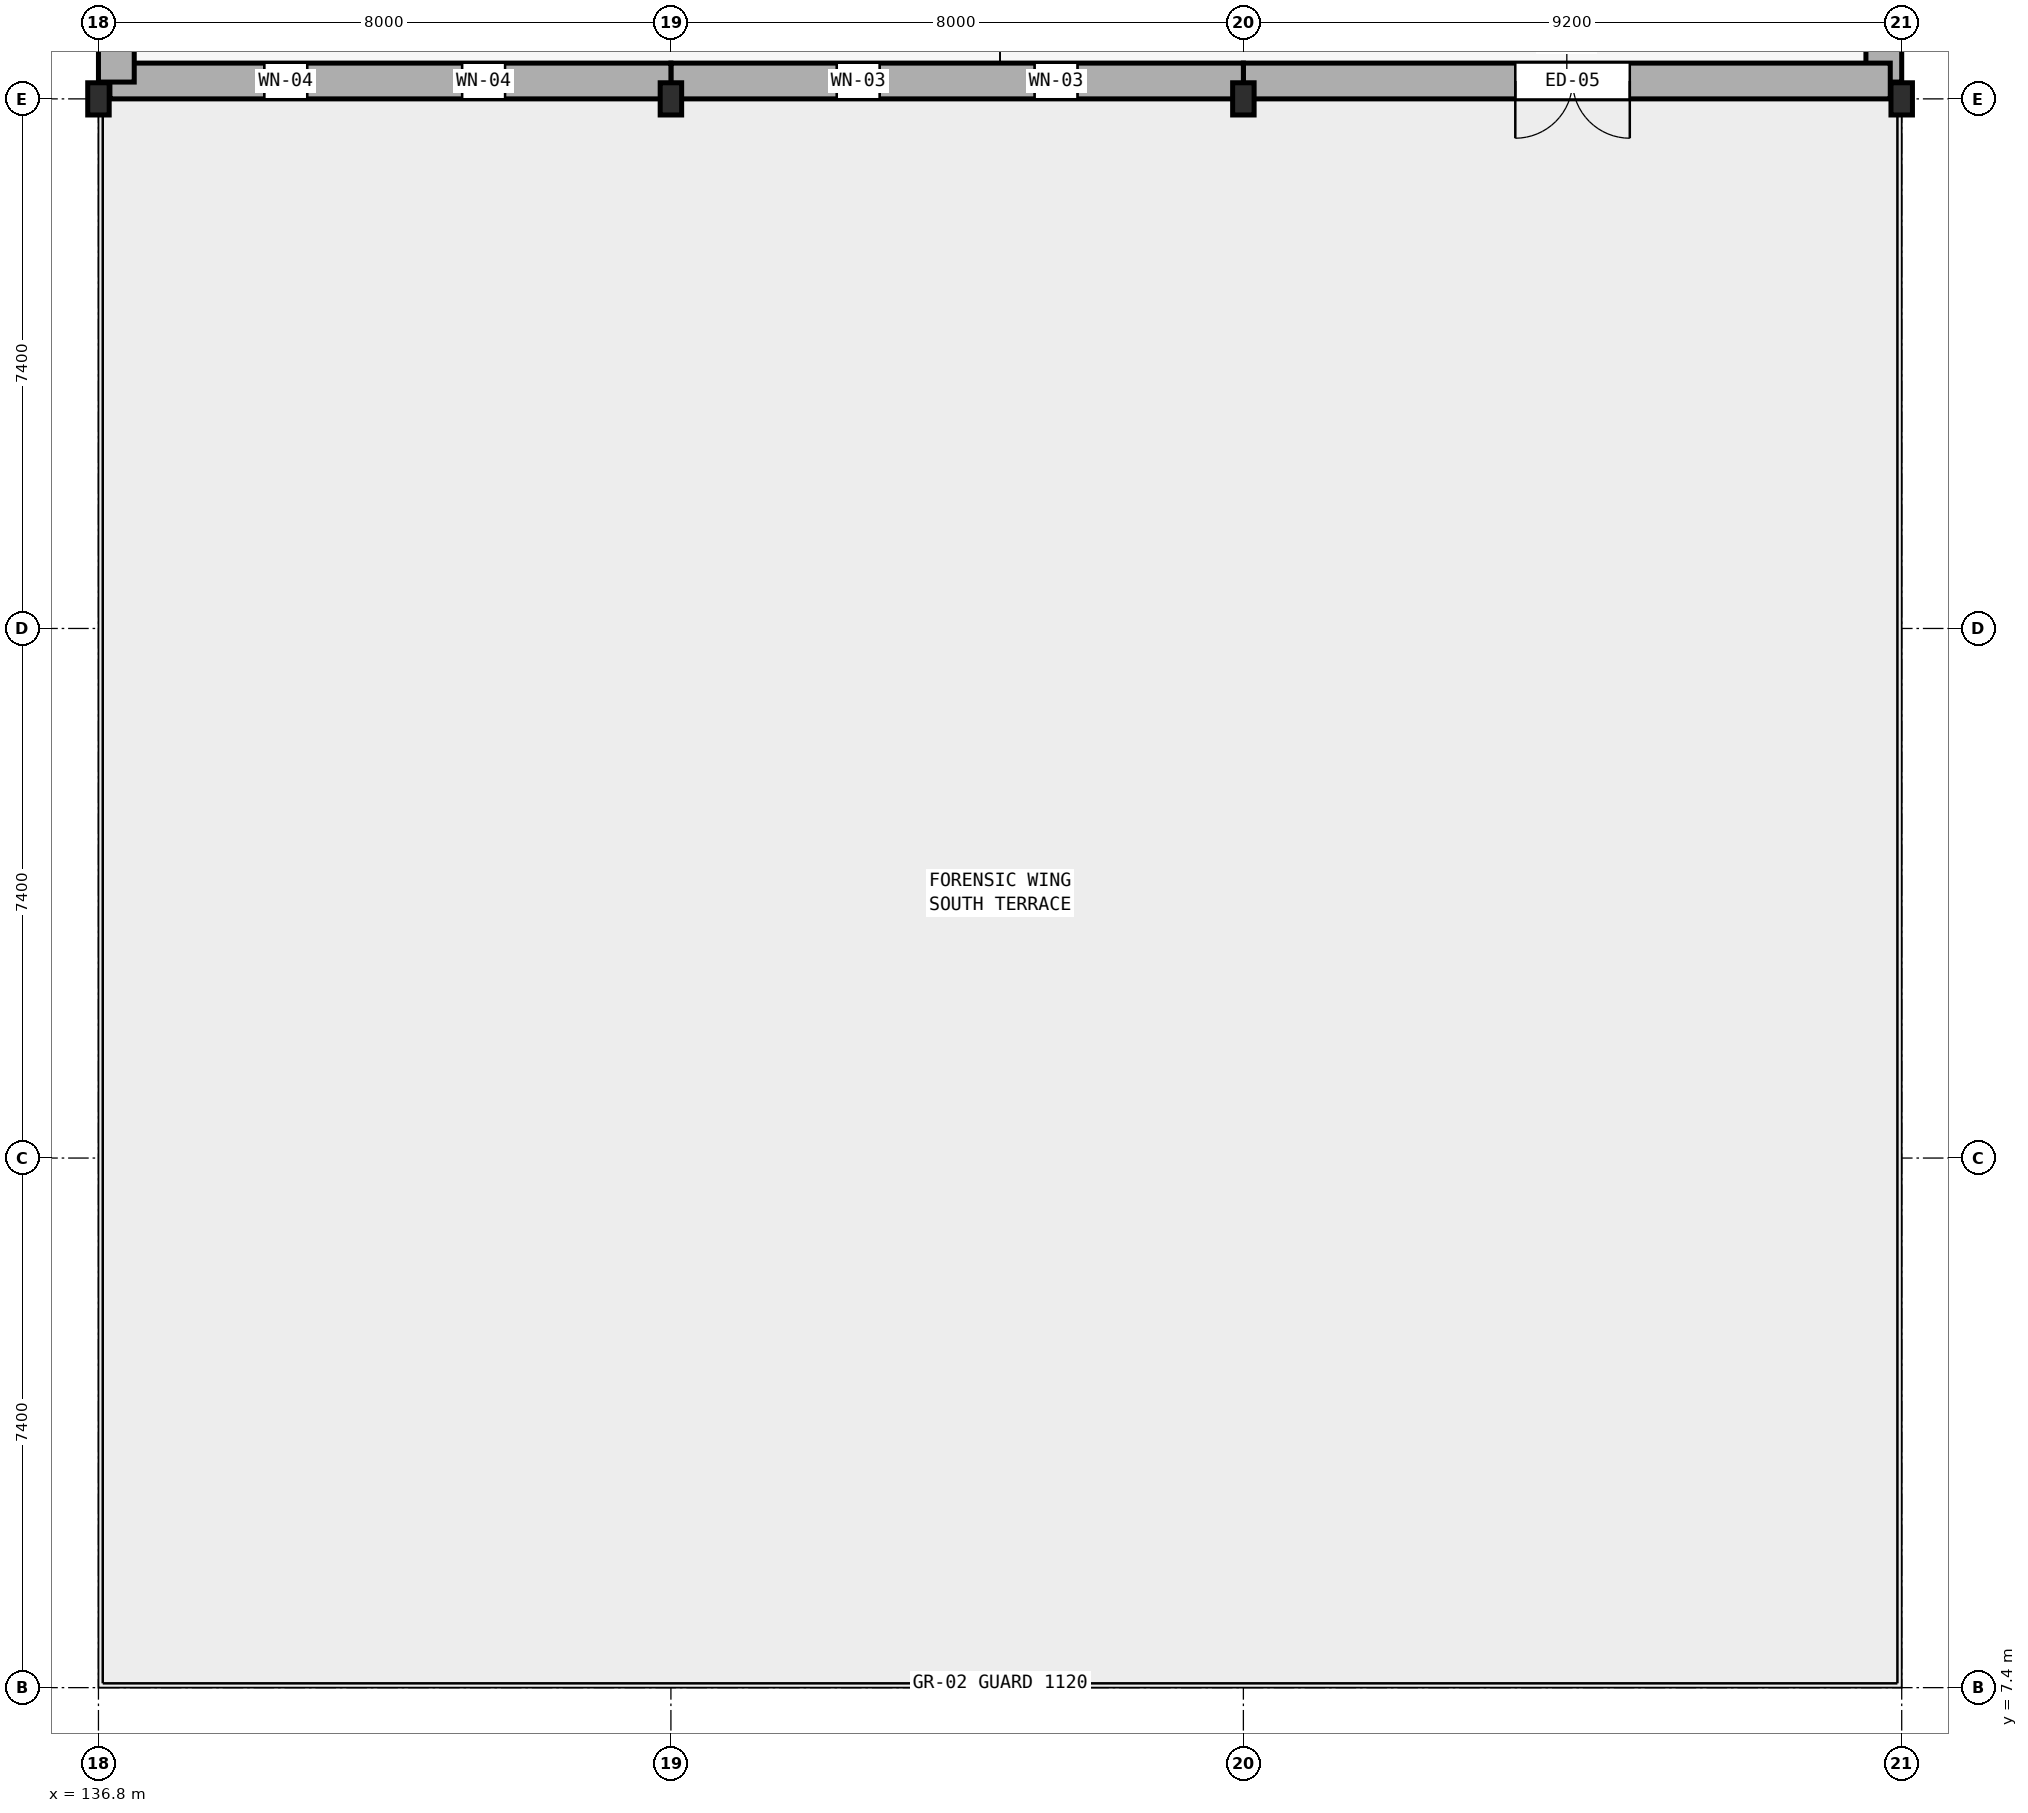
"""IFC4 building model, lengths in metres.
Left out: names, types, materials, properties, quantities, classifications, styles, units other than length and angle.
Written with IfcOpenShell. Run it as: python <this file> out.ifc"""

import sys

from ifc_helpers import new_model, si_unit, direction, frame, frame_2d, origin, origin_2d, place, context, subcontext, project, spatial, rectangle, i_section, extrude, element, fill, save


model = new_model("IFC4")
c1 = context("Model", 3, precision=1e-05, world=origin(), true_north=direction((0.0, 1.0)))
c2 = subcontext(c1, "Body", "Model", "MODEL_VIEW")
j1 = project(units=[si_unit("LENGTHUNIT", "METRE"), si_unit("PLANEANGLEUNIT", "RADIAN")], contexts=[c1])
p1 = place(None, origin())
s1 = spatial("IfcSite", under=j1, at=p1, CompositionType="ELEMENT")
p2 = place(p1, origin())
s2 = spatial("IfcBuilding", under=s1, at=p2, CompositionType="ELEMENT")
p3 = place(p2, frame((0.0, 0.0, 9.9)))
s3 = spatial("IfcBuildingStorey", under=s2, at=p3, CompositionType="ELEMENT", Elevation=9.9)
for number, where, z_axis, x_axis in (
    (1, (136.8, 29.6, 0.0), (0.0, 0.0, 1.0), (1.0, 0.0, 0.0)),
    (2, (144.8, 29.6, 0.0), (0.0, 0.0, 1.0), (1.0, 0.0, 0.0)),
    (3, (152.8, 29.6, 0.0), (0.0, 0.0, 1.0), (1.0, 0.0, 0.0)),
    (4, (162.0, 29.6, 0.0), (0.0, 0.0, 1.0), (1.0, 0.0, 0.0)),
):
    element("IfcColumn", number, at=place(p3, frame(where, z_axis=z_axis, x_axis=x_axis)), inside=s3, PredefinedType="COLUMN", context=c2, shape_type="SweptSolid", body=[
        extrude(i_section(OverallWidth=0.3, OverallDepth=0.45, WebThickness=0.014, FlangeThickness=0.026, FilletRadius=0.027, at=origin_2d()), origin(), (0.0, 0.0, 1.0), 4.2),
    ])
p4 = place(p3, frame((161.75, 37.0, 0.0), z_axis=(0.0, 0.0, 1.0), x_axis=(0.0, -1.0, 0.0)))
e5 = element("IfcWall", 5, at=p4, inside=s3, PredefinedType="STANDARD", context=c2, shape_type="SweptSolid", body=[
    extrude(rectangle(XDim=7.165, YDim=0.5, at=frame_2d((3.583, 0.0))), origin(), (0.0, 0.0, 1.0), 3.92),
])
p5 = place(p4, frame((2.103, 0.0, 0.9)))
e6 = element("IfcOpeningElement", 6, at=p5, cuts=e5, PredefinedType="OPENING", context=c2, shape_type="SweptSolid", body=[
    extrude(rectangle(XDim=0.7, YDim=2.4, at=frame_2d((0.35, 1.2))), frame((0.0, 0.26, 0.0), z_axis=(0.0, -1.0, 0.0), x_axis=(1.0, 0.0, 0.0)), (0.0, 0.0, 1.0), 0.52),
])
p6 = place(p4, frame((4.597, 0.0, 0.9)))
e7 = element("IfcOpeningElement", 7, at=p6, cuts=e5, PredefinedType="OPENING", context=c2, shape_type="SweptSolid", body=[
    extrude(rectangle(XDim=0.7, YDim=2.4, at=frame_2d((0.35, 1.2))), frame((0.0, 0.26, 0.0), z_axis=(0.0, -1.0, 0.0), x_axis=(1.0, 0.0, 0.0)), (0.0, 0.0, 1.0), 0.52),
])
p7 = place(p3, frame((161.84, 29.85, 0.0), z_axis=(0.0, 0.0, 1.0), x_axis=(-1.0, 0.0, 0.0)))
e8 = element("IfcWall", 8, at=p7, inside=s3, PredefinedType="STANDARD", context=c2, shape_type="SweptSolid", body=[
    extrude(rectangle(XDim=9.04, YDim=0.5, at=frame_2d((4.52, 0.0))), origin(), (0.0, 0.0, 1.0), 3.92),
])
p8 = place(p7, frame((3.64, 0.0, 0.0)))
e9 = element("IfcOpeningElement", 9, at=p8, cuts=e8, PredefinedType="OPENING", context=c2, shape_type="SweptSolid", body=[
    extrude(rectangle(XDim=1.6, YDim=2.3, at=frame_2d((0.8, 1.15))), frame((0.0, 0.26, 0.0), z_axis=(0.0, -1.0, 0.0), x_axis=(1.0, 0.0, 0.0)), (0.0, 0.0, 1.0), 0.52),
])
p9 = place(p3, frame((152.8, 29.85, 0.0), z_axis=(0.0, 0.0, 1.0), x_axis=(-1.0, 0.0, 0.0)))
e10 = element("IfcWall", 10, at=p9, inside=s3, PredefinedType="STANDARD", context=c2, shape_type="SweptSolid", body=[
    extrude(rectangle(XDim=8.0, YDim=0.5, at=frame_2d((4.0, 0.0))), origin(), (0.0, 0.0, 1.0), 3.92),
])
p10 = place(p9, frame((2.318, 0.0, 1.35)))
e11 = element("IfcOpeningElement", 11, at=p10, cuts=e10, PredefinedType="OPENING", context=c2, shape_type="SweptSolid", body=[
    extrude(rectangle(XDim=0.6, YDim=1.5, at=frame_2d((0.3, 0.75))), frame((0.0, 0.26, 0.0), z_axis=(0.0, -1.0, 0.0), x_axis=(1.0, 0.0, 0.0)), (0.0, 0.0, 1.0), 0.52),
])
p11 = place(p9, frame((5.083, 0.0, 1.35)))
e12 = element("IfcOpeningElement", 12, at=p11, cuts=e10, PredefinedType="OPENING", context=c2, shape_type="SweptSolid", body=[
    extrude(rectangle(XDim=0.6, YDim=1.5, at=frame_2d((0.3, 0.75))), frame((0.0, 0.26, 0.0), z_axis=(0.0, -1.0, 0.0), x_axis=(1.0, 0.0, 0.0)), (0.0, 0.0, 1.0), 0.52),
])
p12 = place(p3, frame((144.8, 29.85, 0.0), z_axis=(0.0, 0.0, 1.0), x_axis=(-1.0, 0.0, 0.0)))
e13 = element("IfcWall", 13, at=p12, inside=s3, PredefinedType="STANDARD", context=c2, shape_type="SweptSolid", body=[
    extrude(rectangle(XDim=7.84, YDim=0.5, at=frame_2d((3.92, 0.0))), origin(), (0.0, 0.0, 1.0), 3.92),
])
p13 = place(p12, frame((2.318, 0.0, 0.9)))
e14 = element("IfcOpeningElement", 14, at=p13, cuts=e13, PredefinedType="OPENING", context=c2, shape_type="SweptSolid", body=[
    extrude(rectangle(XDim=0.6, YDim=1.85, at=frame_2d((0.3, 0.925))), frame((0.0, 0.26, 0.0), z_axis=(0.0, -1.0, 0.0), x_axis=(1.0, 0.0, 0.0)), (0.0, 0.0, 1.0), 0.52),
])
p14 = place(p12, frame((5.083, 0.0, 0.9)))
e15 = element("IfcOpeningElement", 15, at=p14, cuts=e13, PredefinedType="OPENING", context=c2, shape_type="SweptSolid", body=[
    extrude(rectangle(XDim=0.6, YDim=1.85, at=frame_2d((0.3, 0.925))), frame((0.0, 0.26, 0.0), z_axis=(0.0, -1.0, 0.0), x_axis=(1.0, 0.0, 0.0)), (0.0, 0.0, 1.0), 0.52),
])
p15 = place(p3, frame((137.05, 29.835, 0.0), z_axis=(0.0, 0.0, 1.0), x_axis=(0.0, 1.0, 0.0)))
e16 = element("IfcWall", 16, at=p15, inside=s3, PredefinedType="STANDARD", context=c2, shape_type="SweptSolid", body=[
    extrude(rectangle(XDim=7.165, YDim=0.5, at=frame_2d((3.583, 0.0))), origin(), (0.0, 0.0, 1.0), 3.92),
])
p16 = place(p15, frame((1.743, 0.0, 0.9)))
e17 = element("IfcOpeningElement", 17, at=p16, cuts=e16, PredefinedType="OPENING", context=c2, shape_type="SweptSolid", body=[
    extrude(rectangle(XDim=0.95, YDim=1.8, at=frame_2d((0.475, 0.9))), frame((0.0, 0.26, 0.0), z_axis=(0.0, -1.0, 0.0), x_axis=(1.0, 0.0, 0.0)), (0.0, 0.0, 1.0), 0.52),
])
p17 = place(p15, frame((4.237, 0.0, 0.9)))
e18 = element("IfcOpeningElement", 18, at=p17, cuts=e16, PredefinedType="OPENING", context=c2, shape_type="SweptSolid", body=[
    extrude(rectangle(XDim=0.95, YDim=1.8, at=frame_2d((0.475, 0.9))), frame((0.0, 0.26, 0.0), z_axis=(0.0, -1.0, 0.0), x_axis=(1.0, 0.0, 0.0)), (0.0, 0.0, 1.0), 0.52),
])
p18 = place(p8, origin())
e19 = element("IfcDoor", 19, at=p18, inside=s3, OperationType="DOUBLE_DOOR_SINGLE_SWING", PredefinedType="DOOR", context=c2, shape_type="SweptSolid", body=[
    extrude(rectangle(XDim=1.6, YDim=2.3, at=frame_2d((0.8, 1.15))), frame((0.0, 0.025, 0.0), z_axis=(0.0, -1.0, 0.0), x_axis=(1.0, 0.0, 0.0)), (0.0, 0.0, 1.0), 0.05),
])
fill(e9, e19)
p19 = place(p10, origin())
e20 = element("IfcWindow", 20, at=p19, inside=s3, PartitioningType="SINGLE_PANEL", PredefinedType="WINDOW", context=c2, shape_type="SweptSolid", body=[
    extrude(rectangle(XDim=0.6, YDim=1.5, at=frame_2d((0.3, 0.75))), frame((0.0, 0.03, 0.0), z_axis=(0.0, -1.0, 0.0), x_axis=(1.0, 0.0, 0.0)), (0.0, 0.0, 1.0), 0.06),
])
fill(e11, e20)
p20 = place(p11, origin())
e21 = element("IfcWindow", 21, at=p20, inside=s3, PartitioningType="SINGLE_PANEL", PredefinedType="WINDOW", context=c2, shape_type="SweptSolid", body=[
    extrude(rectangle(XDim=0.6, YDim=1.5, at=frame_2d((0.3, 0.75))), frame((0.0, 0.03, 0.0), z_axis=(0.0, -1.0, 0.0), x_axis=(1.0, 0.0, 0.0)), (0.0, 0.0, 1.0), 0.06),
])
fill(e12, e21)
p21 = place(p13, origin())
e22 = element("IfcWindow", 22, at=p21, inside=s3, PartitioningType="SINGLE_PANEL", PredefinedType="WINDOW", context=c2, shape_type="SweptSolid", body=[
    extrude(rectangle(XDim=0.6, YDim=1.85, at=frame_2d((0.3, 0.925))), frame((0.0, 0.03, 0.0), z_axis=(0.0, -1.0, 0.0), x_axis=(1.0, 0.0, 0.0)), (0.0, 0.0, 1.0), 0.06),
])
fill(e14, e22)
p22 = place(p14, origin())
e23 = element("IfcWindow", 23, at=p22, inside=s3, PartitioningType="SINGLE_PANEL", PredefinedType="WINDOW", context=c2, shape_type="SweptSolid", body=[
    extrude(rectangle(XDim=0.6, YDim=1.85, at=frame_2d((0.3, 0.925))), frame((0.0, 0.03, 0.0), z_axis=(0.0, -1.0, 0.0), x_axis=(1.0, 0.0, 0.0)), (0.0, 0.0, 1.0), 0.06),
])
fill(e15, e23)
save(model, sys.argv[1])
